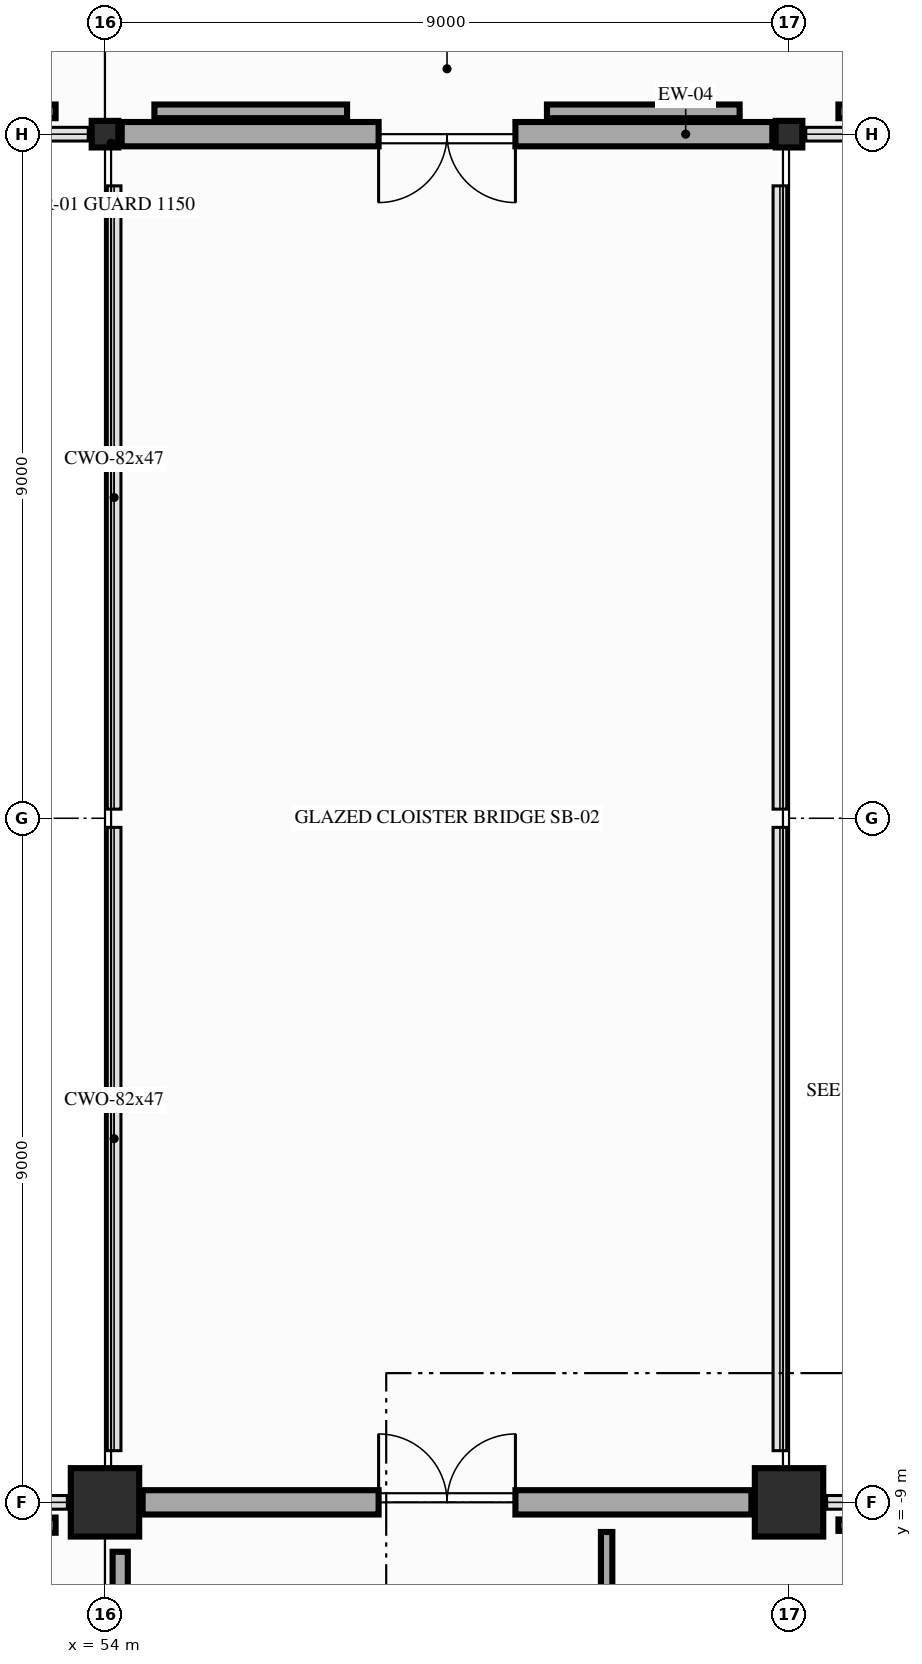
"""IFC4 building model, lengths in metres.
Left out: names, types, materials, properties, quantities, classifications, styles, units other than length and angle.
Written with IfcOpenShell. Run it as: python <this file> out.ifc"""

import sys

from ifc_helpers import new_model, si_unit, direction, frame, frame_2d, origin, origin_2d, place, context, subcontext, project, spatial, rectangle, i_section, extrude, element, fill, save


model = new_model("IFC4")
c1 = context("Model", 3, precision=1e-05, world=origin(), true_north=direction((0.0, 1.0)))
c2 = subcontext(c1, "Body", "Model", "MODEL_VIEW")
j1 = project(units=[si_unit("LENGTHUNIT", "METRE"), si_unit("PLANEANGLEUNIT", "RADIAN")], contexts=[c1])
p1 = place(None, origin())
s1 = spatial("IfcSite", under=j1, at=p1, CompositionType="ELEMENT")
p2 = place(p1, origin())
s2 = spatial("IfcBuilding", under=s1, at=p2, CompositionType="ELEMENT")
p3 = place(p2, frame((0.0, 0.0, 5.4)))
s3 = spatial("IfcBuildingStorey", under=s2, at=p3, CompositionType="ELEMENT", Elevation=5.4)
for number, where, z_axis, x_axis in (
    (1, (54.0, -9.0, 0.0), (0.0, 0.0, 1.0), (1.0, 0.0, 0.0)),
    (2, (63.0, -9.0, 0.0), (0.0, 0.0, 1.0), (1.0, 0.0, 0.0)),
):
    element("IfcColumn", number, at=place(p3, frame(where, z_axis=z_axis, x_axis=x_axis)), inside=s3, PredefinedType="COLUMN", context=c2, shape_type="SweptSolid", body=[
        extrude(rectangle(XDim=0.9, YDim=0.9, at=origin_2d()), origin(), (0.0, 0.0, 1.0), 5.4),
    ])
for number, where, z_axis, x_axis in (
    (3, (54.0, 9.0, 0.0), (0.0, 0.0, 1.0), (1.0, 0.0, 0.0)),
    (4, (63.0, 9.0, 0.0), (0.0, 0.0, 1.0), (1.0, 0.0, 0.0)),
):
    element("IfcColumn", number, at=place(p3, frame(where, z_axis=z_axis, x_axis=x_axis)), inside=s3, PredefinedType="COLUMN", context=c2, shape_type="SweptSolid", body=[
        extrude(i_section(OverallWidth=0.35, OverallDepth=0.35, WebThickness=0.012, FlangeThickness=0.019, FilletRadius=0.02, at=origin_2d()), origin(), (0.0, 0.0, 1.0), 5.4),
    ])
p4 = place(p3, frame((54.495, -9.0, 0.0), z_axis=(0.0, 0.0, 1.0), x_axis=(1.0, 0.0, 0.0)))
e5 = element("IfcWall", 5, at=p4, inside=s3, PredefinedType="SOLIDWALL", context=c2, shape_type="SweptSolid", body=[
    extrude(rectangle(XDim=8.01, YDim=0.32, at=frame_2d((4.005, 0.0))), origin(), (0.0, 0.0, 1.0), 4.375),
])
p5 = place(p4, frame((3.105, 0.0, 0.0)))
e6 = element("IfcOpeningElement", 6, at=p5, cuts=e5, PredefinedType="OPENING", context=c2, shape_type="SweptSolid", body=[
    extrude(rectangle(XDim=1.8, YDim=2.2, at=frame_2d((0.9, 1.1))), frame((0.0, 0.17, 0.0), z_axis=(0.0, -1.0, 0.0), x_axis=(1.0, 0.0, 0.0)), (0.0, 0.0, 1.0), 0.34),
])
p6 = place(p3, frame((62.78, 9.0, 0.0), z_axis=(0.0, 0.0, 1.0), x_axis=(-1.0, 0.0, 0.0)))
e7 = element("IfcWall", 7, at=p6, inside=s3, PredefinedType="SOLIDWALL", context=c2, shape_type="SweptSolid", body=[
    extrude(rectangle(XDim=8.56, YDim=0.32, at=frame_2d((4.28, 0.0))), origin(), (0.0, 0.0, 1.0), 4.537),
])
p7 = place(p6, frame((3.38, 0.0, 0.0)))
e8 = element("IfcOpeningElement", 8, at=p7, cuts=e7, PredefinedType="OPENING", context=c2, shape_type="SweptSolid", body=[
    extrude(rectangle(XDim=1.8, YDim=2.2, at=frame_2d((0.9, 1.1))), frame((0.0, 0.17, 0.0), z_axis=(0.0, -1.0, 0.0), x_axis=(1.0, 0.0, 0.0)), (0.0, 0.0, 1.0), 0.34),
])
p8 = place(p3, frame((54.2, -17.36, 0.0), z_axis=(0.0, 0.0, 1.0), x_axis=(0.0, 1.0, 0.0)))
e9 = element("IfcWall", 9, at=p8, inside=s3, PredefinedType="PARTITIONING", context=c2, shape_type="SweptSolid", body=[
    extrude(rectangle(XDim=7.71, YDim=0.2, at=frame_2d((3.855, 0.0))), origin(), (0.0, 0.0, 1.0), 4.425),
])
p9 = place(p3, frame((53.35, -9.3, 0.0), z_axis=(0.0, 0.0, 1.0), x_axis=(-1.0, 0.0, 0.0)))
e10 = element("IfcWall", 10, at=p9, inside=s3, PredefinedType="PARTITIONING", context=c2, shape_type="SweptSolid", body=[
    extrude(rectangle(XDim=7.7, YDim=0.2, at=frame_2d((3.85, 0.0))), origin(), (0.0, 0.0, 1.0), 4.375),
])
p10 = place(p3, frame((60.6, -9.39, 0.0), z_axis=(0.0, 0.0, 1.0), x_axis=(0.0, -1.0, 0.0)))
e11 = element("IfcWall", 11, at=p10, inside=s3, PredefinedType="PARTITIONING", context=c2, shape_type="SweptSolid", body=[
    extrude(rectangle(XDim=13.91, YDim=0.15, at=frame_2d((6.955, 0.0))), origin(), (0.0, 0.0, 1.0), 4.375),
])
p11 = place(p10, frame((3.067, 0.0, 0.0)))
e12 = element("IfcOpeningElement", 12, at=p11, cuts=e11, PredefinedType="OPENING", context=c2, shape_type="SweptSolid", body=[
    extrude(rectangle(XDim=1.1, YDim=2.15, at=frame_2d((0.55, 1.075))), frame((0.0, 0.085, 0.0), z_axis=(0.0, -1.0, 0.0), x_axis=(1.0, 0.0, 0.0)), (0.0, 0.0, 1.0), 0.17),
])
p12 = place(p3, frame((71.35, -9.3, 0.0), z_axis=(0.0, 0.0, 1.0), x_axis=(-1.0, 0.0, 0.0)))
e13 = element("IfcWall", 13, at=p12, inside=s3, PredefinedType="PARTITIONING", context=c2, shape_type="SweptSolid", body=[
    extrude(rectangle(XDim=7.7, YDim=0.15, at=frame_2d((3.85, 0.0))), origin(), (0.0, 0.0, 1.0), 4.375),
])
p13 = place(p3, frame((45.65, 9.3, 0.0), z_axis=(0.0, 0.0, 1.0), x_axis=(1.0, 0.0, 0.0)))
e14 = element("IfcWall", 14, at=p13, inside=s3, PredefinedType="PARTITIONING", context=c2, shape_type="SweptSolid", body=[
    extrude(rectangle(XDim=7.7, YDim=0.18, at=frame_2d((3.85, 0.0))), origin(), (0.0, 0.0, 1.0), 4.537),
])
for number, where, z_axis, x_axis in (
    (15, (54.65, 9.3, 0.0), (0.0, 0.0, 1.0), (1.0, 0.0, 0.0)),
    (16, (59.815, 9.3, 0.0), (0.0, 0.0, 1.0), (1.0, 0.0, 0.0)),
):
    element("IfcWall", number, at=place(p3, frame(where, z_axis=z_axis, x_axis=x_axis)), inside=s3, PredefinedType="PARTITIONING", context=c2, shape_type="SweptSolid", body=[
        extrude(rectangle(XDim=2.535, YDim=0.18, at=frame_2d((1.268, 0.0))), origin(), (0.0, 0.0, 1.0), 4.537),
    ])
p14 = place(p3, frame((63.65, 9.3, 0.0), z_axis=(0.0, 0.0, 1.0), x_axis=(1.0, 0.0, 0.0)))
e17 = element("IfcWall", 17, at=p14, inside=s3, PredefinedType="PARTITIONING", context=c2, shape_type="SweptSolid", body=[
    extrude(rectangle(XDim=7.7, YDim=0.18, at=frame_2d((3.85, 0.0))), origin(), (0.0, 0.0, 1.0), 4.537),
])
p15 = place(p5, origin())
e18 = element("IfcDoor", 18, at=p15, inside=s3, OperationType="DOUBLE_DOOR_SINGLE_SWING", PredefinedType="DOOR", context=c2, shape_type="SweptSolid", body=[
    extrude(rectangle(XDim=1.8, YDim=2.2, at=frame_2d((0.9, 1.1))), frame((0.0, 0.025, 0.0), z_axis=(0.0, -1.0, 0.0), x_axis=(1.0, 0.0, 0.0)), (0.0, 0.0, 1.0), 0.05),
])
fill(e6, e18)
p16 = place(p7, origin())
e19 = element("IfcDoor", 19, at=p16, inside=s3, OperationType="DOUBLE_DOOR_SINGLE_SWING", PredefinedType="DOOR", context=c2, shape_type="SweptSolid", body=[
    extrude(rectangle(XDim=1.8, YDim=2.2, at=frame_2d((0.9, 1.1))), frame((0.0, 0.025, 0.0), z_axis=(0.0, -1.0, 0.0), x_axis=(1.0, 0.0, 0.0)), (0.0, 0.0, 1.0), 0.05),
])
fill(e8, e19)
save(model, sys.argv[1])
